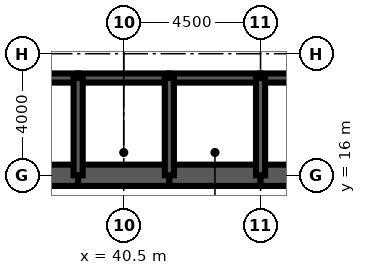
"""IFC4 building model, lengths in metres.
Left out: names, types, materials, properties, quantities, classifications, styles, units other than length and angle.
Written with IfcOpenShell. Run it as: python <this file> out.ifc"""

import sys

from ifc_helpers import new_model, si_unit, direction, frame, frame_2d, origin, place, context, subcontext, project, spatial, rectangle, extrude, element, fill, save


model = new_model("IFC4")
c1 = context("Model", 3, precision=1e-05, world=origin(), true_north=direction((0.0, 1.0)))
c2 = subcontext(c1, "Body", "Model", "MODEL_VIEW")
j1 = project(units=[si_unit("LENGTHUNIT", "METRE"), si_unit("PLANEANGLEUNIT", "RADIAN")], contexts=[c1])
p1 = place(None, origin())
s1 = spatial("IfcSite", under=j1, at=p1, CompositionType="ELEMENT")
p2 = place(p1, origin())
s2 = spatial("IfcBuilding", under=s1, at=p2, CompositionType="ELEMENT")
p3 = place(p2, frame((0.0, 0.0, 304.7)))
s3 = spatial("IfcBuildingStorey", under=s2, at=p3, CompositionType="ELEMENT", Elevation=304.7)
for number, where, z_axis, x_axis in (
    (1, (36.0, 16.0, 0.0), (0.0, 0.0, 1.0), (1.0, 0.0, 0.0)),
    (2, (39.0, 16.0, 0.0), (0.0, 0.0, 1.0), (1.0, 0.0, 0.0)),
    (3, (42.0, 16.0, 0.0), (0.0, 0.0, 1.0), (1.0, 0.0, 0.0)),
):
    element("IfcWall", number, at=place(p3, frame(where, z_axis=z_axis, x_axis=x_axis)), inside=s3, PredefinedType="SHEAR", context=c2, shape_type="SweptSolid", body=[
        extrude(rectangle(XDim=3.0, YDim=0.7, at=frame_2d((1.5, 0.0))), origin(), (0.0, 0.0, 1.0), 4.2),
    ])
p4 = place(p3, frame((45.0, 16.0, 0.0), z_axis=(0.0, 0.0, 1.0), x_axis=(1.0, 0.0, 0.0)))
e4 = element("IfcWall", 4, at=p4, inside=s3, PredefinedType="SHEAR", context=c2, shape_type="SweptSolid", body=[
    extrude(rectangle(XDim=9.35, YDim=0.7, at=frame_2d((4.675, 0.0))), origin(), (0.0, 0.0, 1.0), 4.2),
])
p5 = place(p3, frame((36.0, 19.2, 0.0), z_axis=(0.0, 0.0, 1.0), x_axis=(1.0, 0.0, 0.0)))
e5 = element("IfcWall", 5, at=p5, inside=s3, PredefinedType="SOLIDWALL", context=c2, shape_type="SweptSolid", body=[
    extrude(rectangle(XDim=3.0, YDim=0.3, at=frame_2d((1.5, 0.0))), origin(), (0.0, 0.0, 1.0), 4.2),
])
p6 = place(p5, frame((0.95, 0.0, 0.0)))
e6 = element("IfcOpeningElement", 6, at=p6, cuts=e5, PredefinedType="OPENING", context=c2, shape_type="SweptSolid", body=[
    extrude(rectangle(XDim=1.1, YDim=2.2, at=frame_2d((0.55, 1.1))), frame((0.0, 0.16, 0.0), z_axis=(0.0, -1.0, 0.0), x_axis=(1.0, 0.0, 0.0)), (0.0, 0.0, 1.0), 0.32),
])
p7 = place(p3, frame((39.0, 19.2, 0.0), z_axis=(0.0, 0.0, 1.0), x_axis=(1.0, 0.0, 0.0)))
e7 = element("IfcWall", 7, at=p7, inside=s3, PredefinedType="SOLIDWALL", context=c2, shape_type="SweptSolid", body=[
    extrude(rectangle(XDim=3.0, YDim=0.3, at=frame_2d((1.5, 0.0))), origin(), (0.0, 0.0, 1.0), 4.2),
])
p8 = place(p7, frame((1.0, 0.0, 0.0)))
e8 = element("IfcOpeningElement", 8, at=p8, cuts=e7, PredefinedType="OPENING", context=c2, shape_type="SweptSolid", body=[
    extrude(rectangle(XDim=1.0, YDim=2.1, at=frame_2d((0.5, 1.05))), frame((0.0, 0.16, 0.0), z_axis=(0.0, -1.0, 0.0), x_axis=(1.0, 0.0, 0.0)), (0.0, 0.0, 1.0), 0.32),
])
p9 = place(p3, frame((42.0, 19.2, 0.0), z_axis=(0.0, 0.0, 1.0), x_axis=(1.0, 0.0, 0.0)))
e9 = element("IfcWall", 9, at=p9, inside=s3, PredefinedType="SOLIDWALL", context=c2, shape_type="SweptSolid", body=[
    extrude(rectangle(XDim=3.0, YDim=0.3, at=frame_2d((1.5, 0.0))), origin(), (0.0, 0.0, 1.0), 4.2),
])
p10 = place(p9, frame((1.0, 0.0, 0.0)))
e10 = element("IfcOpeningElement", 10, at=p10, cuts=e9, PredefinedType="OPENING", context=c2, shape_type="SweptSolid", body=[
    extrude(rectangle(XDim=1.0, YDim=2.1, at=frame_2d((0.5, 1.05))), frame((0.0, 0.16, 0.0), z_axis=(0.0, -1.0, 0.0), x_axis=(1.0, 0.0, 0.0)), (0.0, 0.0, 1.0), 0.32),
])
p11 = place(p3, frame((45.0, 19.2, 0.0), z_axis=(0.0, 0.0, 1.0), x_axis=(1.0, 0.0, 0.0)))
e11 = element("IfcWall", 11, at=p11, inside=s3, PredefinedType="SOLIDWALL", context=c2, shape_type="SweptSolid", body=[
    extrude(rectangle(XDim=9.0, YDim=0.3, at=frame_2d((4.5, 0.0))), origin(), (0.0, 0.0, 1.0), 4.2),
])
p12 = place(p11, frame((7.35, 0.0, 0.0)))
e12 = element("IfcOpeningElement", 12, at=p12, cuts=e11, PredefinedType="OPENING", context=c2, shape_type="SweptSolid", body=[
    extrude(rectangle(XDim=1.0, YDim=2.1, at=frame_2d((0.5, 1.05))), frame((0.0, 0.16, 0.0), z_axis=(0.0, -1.0, 0.0), x_axis=(1.0, 0.0, 0.0)), (0.0, 0.0, 1.0), 0.32),
])
for number, where, z_axis, x_axis in (
    (13, (39.0, 16.0, 0.0), (0.0, 0.0, 1.0), (0.0, 1.0, 0.0)),
    (14, (42.0, 16.0, 0.0), (0.0, 0.0, 1.0), (0.0, 1.0, 0.0)),
    (15, (45.0, 16.0, 0.0), (0.0, 0.0, 1.0), (0.0, 1.0, 0.0)),
):
    element("IfcWall", number, at=place(p3, frame(where, z_axis=z_axis, x_axis=x_axis)), inside=s3, PredefinedType="SOLIDWALL", context=c2, shape_type="SweptSolid", body=[
        extrude(rectangle(XDim=3.2, YDim=0.3, at=frame_2d((1.6, 0.0))), origin(), (0.0, 0.0, 1.0), 4.2),
    ])
p13 = place(p3, frame((39.15, 17.3, 0.0), z_axis=(0.0, 0.0, 1.0), x_axis=(1.0, 0.0, 0.0)))
e16 = element("IfcWall", 16, at=p13, inside=s3, PredefinedType="SOLIDWALL", context=c2, shape_type="SweptSolid", body=[
    extrude(rectangle(XDim=2.7, YDim=0.3, at=frame_2d((1.35, 0.0))), origin(), (0.0, 0.0, 1.0), 4.04),
])
p14 = place(p13, frame((0.85, 0.0, 0.0)))
e17 = element("IfcOpeningElement", 17, at=p14, cuts=e16, PredefinedType="OPENING", context=c2, shape_type="SweptSolid", body=[
    extrude(rectangle(XDim=1.0, YDim=2.1, at=frame_2d((0.5, 1.05))), frame((0.0, 0.16, 0.0), z_axis=(0.0, -1.0, 0.0), x_axis=(1.0, 0.0, 0.0)), (0.0, 0.0, 1.0), 0.32),
])
p15 = place(p3, frame((42.15, 17.3, 0.0), z_axis=(0.0, 0.0, 1.0), x_axis=(1.0, 0.0, 0.0)))
e18 = element("IfcWall", 18, at=p15, inside=s3, PredefinedType="SOLIDWALL", context=c2, shape_type="SweptSolid", body=[
    extrude(rectangle(XDim=2.7, YDim=0.3, at=frame_2d((1.35, 0.0))), origin(), (0.0, 0.0, 1.0), 4.04),
])
p16 = place(p15, frame((0.85, 0.0, 0.0)))
e19 = element("IfcOpeningElement", 19, at=p16, cuts=e18, PredefinedType="OPENING", context=c2, shape_type="SweptSolid", body=[
    extrude(rectangle(XDim=1.0, YDim=2.1, at=frame_2d((0.5, 1.05))), frame((0.0, 0.16, 0.0), z_axis=(0.0, -1.0, 0.0), x_axis=(1.0, 0.0, 0.0)), (0.0, 0.0, 1.0), 0.32),
])
p17 = place(p14, origin())
e20 = element("IfcDoor", 20, at=p17, inside=s3, OperationType="SINGLE_SWING_LEFT", PredefinedType="DOOR", context=c2, shape_type="SweptSolid", body=[
    extrude(rectangle(XDim=1.0, YDim=2.1, at=frame_2d((0.5, 1.05))), frame((0.0, 0.025, 0.0), z_axis=(0.0, -1.0, 0.0), x_axis=(1.0, 0.0, 0.0)), (0.0, 0.0, 1.0), 0.05),
])
fill(e17, e20)
p18 = place(p16, origin())
e21 = element("IfcDoor", 21, at=p18, inside=s3, OperationType="SINGLE_SWING_LEFT", PredefinedType="DOOR", context=c2, shape_type="SweptSolid", body=[
    extrude(rectangle(XDim=1.0, YDim=2.1, at=frame_2d((0.5, 1.05))), frame((0.0, 0.025, 0.0), z_axis=(0.0, -1.0, 0.0), x_axis=(1.0, 0.0, 0.0)), (0.0, 0.0, 1.0), 0.05),
])
fill(e19, e21)
p19 = place(p8, origin())
e22 = element("IfcDoor", 22, at=p19, inside=s3, OperationType="SINGLE_SWING_LEFT", PredefinedType="DOOR", context=c2, shape_type="SweptSolid", body=[
    extrude(rectangle(XDim=1.0, YDim=2.1, at=frame_2d((0.5, 1.05))), frame((0.0, 0.025, 0.0), z_axis=(0.0, -1.0, 0.0), x_axis=(1.0, 0.0, 0.0)), (0.0, 0.0, 1.0), 0.05),
])
fill(e8, e22)
p20 = place(p10, origin())
e23 = element("IfcDoor", 23, at=p20, inside=s3, OperationType="SINGLE_SWING_LEFT", PredefinedType="DOOR", context=c2, shape_type="SweptSolid", body=[
    extrude(rectangle(XDim=1.0, YDim=2.1, at=frame_2d((0.5, 1.05))), frame((0.0, 0.025, 0.0), z_axis=(0.0, -1.0, 0.0), x_axis=(1.0, 0.0, 0.0)), (0.0, 0.0, 1.0), 0.05),
])
fill(e10, e23)
save(model, sys.argv[1])
